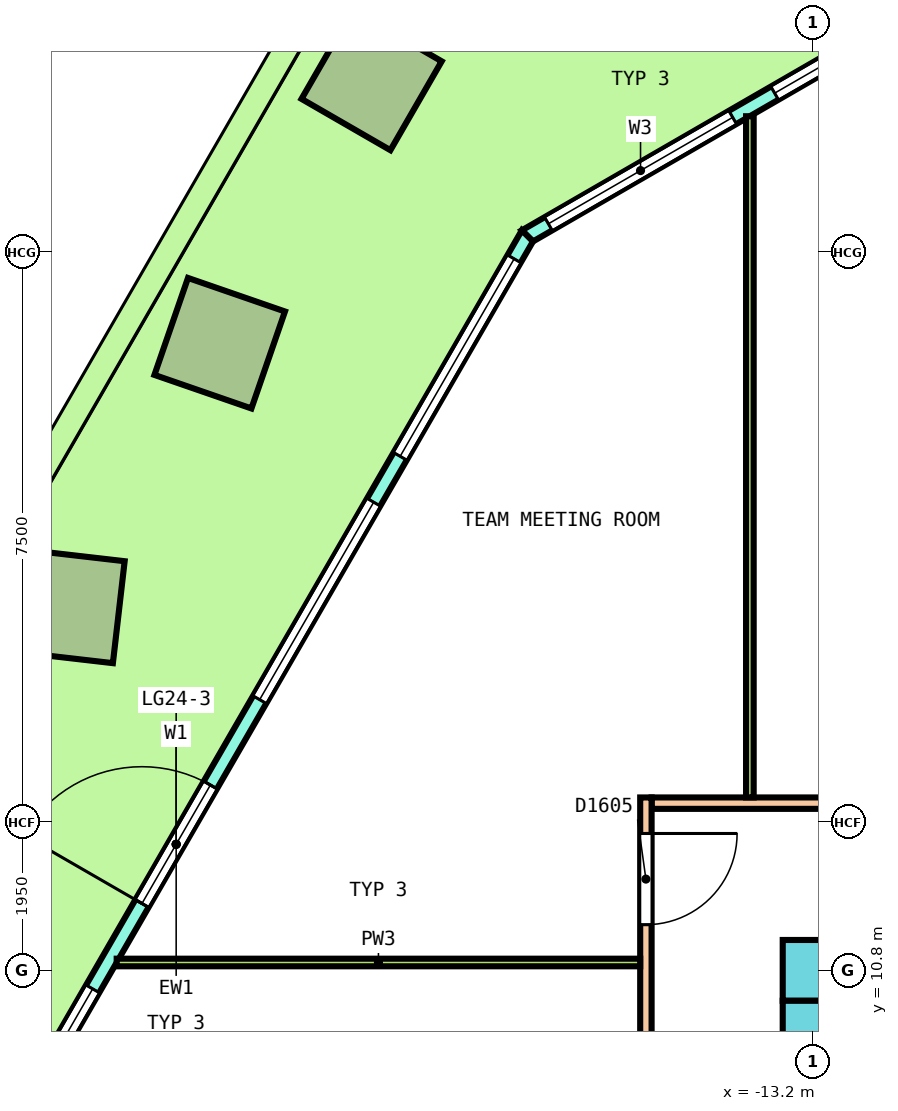
"""IFC4 building model, lengths in metres.
Left out: names, types, materials, properties, quantities, classifications, styles, units other than length and angle.
Written with IfcOpenShell. Run it as: python <this file> out.ifc"""

import sys

from ifc_helpers import new_model, si_unit, direction, frame, frame_2d, origin, origin_2d, place, context, subcontext, project, spatial, polyline, rectangle, outline, extrude, element, fill, save


model = new_model("IFC4")
c1 = context("Model", 3, precision=1e-05, world=origin(), true_north=direction((0.0, 1.0)))
c2 = subcontext(c1, "Body", "Model", "MODEL_VIEW")
j1 = project(units=[si_unit("LENGTHUNIT", "METRE"), si_unit("PLANEANGLEUNIT", "RADIAN")], contexts=[c1])
p1 = place(None, origin())
s1 = spatial("IfcSite", under=j1, at=p1, CompositionType="ELEMENT")
p2 = place(p1, origin())
s2 = spatial("IfcBuilding", under=s1, at=p2, CompositionType="ELEMENT")
p3 = place(p2, frame((0.0, 0.0, 113.2)))
s3 = spatial("IfcBuildingStorey", under=s2, at=p3, CompositionType="ELEMENT", Elevation=113.2)
p4 = place(p3, frame((-19.009, 22.512, 0.0), z_axis=(-0.036205074038, 0.0, 0.999344381389), x_axis=(-0.499425957592, -0.866167613071, -0.018093616283)))
e1 = element("IfcColumn", 1, at=p4, inside=s3, PredefinedType="COLUMN", context=c2, shape_type="SweptSolid", body=[
    extrude(rectangle(XDim=1.35, YDim=1.35, at=origin_2d()), origin(), (0.0, 0.0, 1.0), 4.053),
])
p5 = place(p3, frame((-21.007, 19.051, 0.0), z_axis=(-0.032654174822, 0.006325993277, 0.999446690262), x_axis=(-0.500478631698, -0.865680616164, -0.010872442804)))
e2 = element("IfcColumn", 2, at=p5, inside=s3, PredefinedType="COLUMN", context=c2, shape_type="SweptSolid", body=[
    extrude(rectangle(XDim=1.35, YDim=1.35, at=origin_2d()), origin(), (0.0, 0.0, 1.0), 4.052),
])
p6 = place(p3, frame((-23.006, 15.59, 0.0), z_axis=(-0.028980660531, 0.012532177527, 0.999501408624), x_axis=(-0.499450496938, -0.866334867635, -0.003619147421)))
e3 = element("IfcColumn", 3, at=p6, inside=s3, PredefinedType="COLUMN", context=c2, shape_type="SweptSolid", body=[
    extrude(rectangle(XDim=1.35, YDim=1.35, at=origin_2d()), origin(), (0.0, 0.0, 1.0), 4.052),
])
p7 = place(p3, frame((-11.005, 23.9, 0.0), z_axis=(0.0, 0.0, 1.0), x_axis=(-0.866029458321, -0.49999297727, 0.0)))
e4 = element("IfcWall", 4, at=p7, inside=s3, PredefinedType="SOLIDWALL", context=c2, shape_type="SweptSolid", body=[
    extrude(outline(polyline([(-0.027, -0.1), (1.128, -0.1), (2.282, -0.1), (3.437, -0.1), (4.592, -0.1), (5.747, -0.1), (6.901, -0.1), (6.848, 0.1), (5.711, 0.1), (4.574, 0.1), (3.437, 0.1), (2.301, 0.1), (1.164, 0.1), (0.027, 0.1), (-0.027, -0.1)])), origin(), (0.0, 0.0, 1.0), 4.1),
])
p8 = place(p7, frame((0.319, 0.0, 0.1)))
e5 = element("IfcOpeningElement", 5, at=p8, cuts=e4, PredefinedType="OPENING", context=c2, shape_type="SweptSolid", body=[
    extrude(rectangle(XDim=2.8, YDim=2.9, at=frame_2d((1.4, 1.45))), frame((0.0, 0.11, 0.0), z_axis=(0.0, -1.0, 0.0), x_axis=(1.0, 0.0, 0.0)), (0.0, 0.0, 1.0), 0.22),
])
p9 = place(p7, frame((3.756, 0.0, 0.1)))
e6 = element("IfcOpeningElement", 6, at=p9, cuts=e4, PredefinedType="OPENING", context=c2, shape_type="SweptSolid", body=[
    extrude(rectangle(XDim=2.8, YDim=2.9, at=frame_2d((1.4, 1.45))), frame((0.0, 0.11, 0.0), z_axis=(0.0, -1.0, 0.0), x_axis=(1.0, 0.0, 0.0)), (0.0, 0.0, 1.0), 0.22),
])
p10 = place(p3, frame((-16.959, 20.463, 0.0), z_axis=(0.0, 0.0, 1.0), x_axis=(-0.500000293238, -0.866025234483, 0.0)))
e7 = element("IfcWall", 7, at=p10, inside=s3, PredefinedType="SOLIDWALL", context=c2, shape_type="SweptSolid", body=[
    extrude(outline(polyline([(-0.027, -0.1), (1.003, -0.1), (2.033, -0.1), (3.063, -0.1), (4.093, -0.1), (5.122, -0.1), (6.152, -0.1), (7.182, -0.1), (8.212, -0.1), (9.242, -0.1), (10.271, -0.1), (11.301, -0.1), (12.331, -0.1), (13.361, -0.1), (14.391, -0.1), (15.421, -0.1), (16.451, -0.1), (17.48, -0.1), (18.51, -0.1), (18.457, 0.1), (17.433, 0.1), (16.409, 0.1), (15.385, 0.1), (14.361, 0.1), (13.337, 0.1), (12.313, 0.1), (11.29, 0.1), (10.266, 0.1), (9.242, 0.1), (8.218, 0.1), (7.194, 0.1), (6.17, 0.1), (5.146, 0.1), (4.122, 0.1), (3.098, 0.1), (2.075, 0.1), (1.051, 0.1), (0.027, 0.1), (-0.027, -0.1)])), origin(), (0.0, 0.0, 1.0), 4.1),
])
p11 = place(p10, frame((0.348, 0.0, 0.1)))
e8 = element("IfcOpeningElement", 8, at=p11, cuts=e7, PredefinedType="OPENING", context=c2, shape_type="SweptSolid", body=[
    extrude(rectangle(XDim=3.0, YDim=2.9, at=frame_2d((1.5, 1.45))), frame((0.0, 0.11, 0.0), z_axis=(0.0, -1.0, 0.0), x_axis=(1.0, 0.0, 0.0)), (0.0, 0.0, 1.0), 0.22),
])
p12 = place(p10, frame((4.045, 0.0, 0.1)))
e9 = element("IfcOpeningElement", 9, at=p12, cuts=e7, PredefinedType="OPENING", context=c2, shape_type="SweptSolid", body=[
    extrude(rectangle(XDim=3.0, YDim=2.9, at=frame_2d((1.5, 1.45))), frame((0.0, 0.11, 0.0), z_axis=(0.0, -1.0, 0.0), x_axis=(1.0, 0.0, 0.0)), (0.0, 0.0, 1.0), 0.22),
])
p13 = place(p10, frame((8.342, 0.0, 0.0)))
e10 = element("IfcOpeningElement", 10, at=p13, cuts=e7, PredefinedType="OPENING", context=c2, shape_type="SweptSolid", body=[
    extrude(rectangle(XDim=1.8, YDim=2.4, at=frame_2d((0.9, 1.2))), frame((0.0, 0.11, 0.0), z_axis=(0.0, -1.0, 0.0), x_axis=(1.0, 0.0, 0.0)), (0.0, 0.0, 1.0), 0.22),
])
p14 = place(p10, frame((8.342, 0.0, 2.55)))
e11 = element("IfcOpeningElement", 11, at=p14, cuts=e7, PredefinedType="OPENING", context=c2, shape_type="SweptSolid", body=[
    extrude(rectangle(XDim=1.8, YDim=0.45, at=frame_2d((0.9, 0.225))), frame((0.0, 0.11, 0.0), z_axis=(0.0, -1.0, 0.0), x_axis=(1.0, 0.0, 0.0)), (0.0, 0.0, 1.0), 0.22),
])
p15 = place(p10, frame((11.438, 0.0, 0.1)))
e12 = element("IfcOpeningElement", 12, at=p15, cuts=e7, PredefinedType="OPENING", context=c2, shape_type="SweptSolid", body=[
    extrude(rectangle(XDim=3.0, YDim=2.9, at=frame_2d((1.5, 1.45))), frame((0.0, 0.11, 0.0), z_axis=(0.0, -1.0, 0.0), x_axis=(1.0, 0.0, 0.0)), (0.0, 0.0, 1.0), 0.22),
])
p16 = place(p10, frame((15.135, 0.0, 0.1)))
e13 = element("IfcOpeningElement", 13, at=p16, cuts=e7, PredefinedType="OPENING", context=c2, shape_type="SweptSolid", body=[
    extrude(rectangle(XDim=3.0, YDim=2.9, at=frame_2d((1.5, 1.45))), frame((0.0, 0.11, 0.0), z_axis=(0.0, -1.0, 0.0), x_axis=(1.0, 0.0, 0.0)), (0.0, 0.0, 1.0), 0.22),
])
p17 = place(p3, frame((-13.6, 10.8, 0.0), z_axis=(0.0, 0.0, 1.0), x_axis=(1.0, 0.0, 0.0)))
e14 = element("IfcWall", 14, at=p17, inside=s3, PredefinedType="SHEAR", context=c2, shape_type="SweptSolid", body=[
    extrude(rectangle(XDim=27.2, YDim=0.8, at=frame_2d((13.6, 0.0))), origin(), (0.0, 0.0, 1.0), 4.1),
])
p18 = place(p17, frame((2.308, 0.0, 0.0)))
e15 = element("IfcOpeningElement", 15, at=p18, cuts=e14, PredefinedType="OPENING", context=c2, shape_type="SweptSolid", body=[
    extrude(rectangle(XDim=1.0, YDim=2.1, at=frame_2d((0.5, 1.05))), frame((0.0, 0.41, 0.0), z_axis=(0.0, -1.0, 0.0), x_axis=(1.0, 0.0, 0.0)), (0.0, 0.0, 1.0), 0.82),
])
p19 = place(p17, frame((6.419, 0.0, 0.0)))
e16 = element("IfcOpeningElement", 16, at=p19, cuts=e14, PredefinedType="OPENING", context=c2, shape_type="SweptSolid", body=[
    extrude(rectangle(XDim=1.0, YDim=2.1, at=frame_2d((0.5, 1.05))), frame((0.0, 0.41, 0.0), z_axis=(0.0, -1.0, 0.0), x_axis=(1.0, 0.0, 0.0)), (0.0, 0.0, 1.0), 0.82),
])
p20 = place(p17, frame((10.498, 0.0, 0.0)))
e17 = element("IfcOpeningElement", 17, at=p20, cuts=e14, PredefinedType="OPENING", context=c2, shape_type="SweptSolid", body=[
    extrude(rectangle(XDim=1.0, YDim=2.1, at=frame_2d((0.5, 1.05))), frame((0.0, 0.41, 0.0), z_axis=(0.0, -1.0, 0.0), x_axis=(1.0, 0.0, 0.0)), (0.0, 0.0, 1.0), 0.82),
])
p21 = place(p17, frame((18.035, 0.0, 0.0)))
e18 = element("IfcOpeningElement", 18, at=p21, cuts=e14, PredefinedType="OPENING", context=c2, shape_type="SweptSolid", body=[
    extrude(rectangle(XDim=1.0, YDim=2.1, at=frame_2d((0.5, 1.05))), frame((0.0, 0.41, 0.0), z_axis=(0.0, -1.0, 0.0), x_axis=(1.0, 0.0, 0.0)), (0.0, 0.0, 1.0), 0.82),
])
p22 = place(p17, frame((21.181, 0.0, 0.0)))
e19 = element("IfcOpeningElement", 19, at=p22, cuts=e14, PredefinedType="OPENING", context=c2, shape_type="SweptSolid", body=[
    extrude(rectangle(XDim=1.0, YDim=2.1, at=frame_2d((0.5, 1.05))), frame((0.0, 0.41, 0.0), z_axis=(0.0, -1.0, 0.0), x_axis=(1.0, 0.0, 0.0)), (0.0, 0.0, 1.0), 0.82),
])
p23 = place(p17, frame((24.358, 0.0, 0.0)))
e20 = element("IfcOpeningElement", 20, at=p23, cuts=e14, PredefinedType="OPENING", context=c2, shape_type="SweptSolid", body=[
    extrude(rectangle(XDim=1.0, YDim=2.1, at=frame_2d((0.5, 1.05))), frame((0.0, 0.41, 0.0), z_axis=(0.0, -1.0, 0.0), x_axis=(1.0, 0.0, 0.0)), (0.0, 0.0, 1.0), 0.82),
])
p24 = place(p17, frame((14.525, 0.0, 0.0)))
e21 = element("IfcOpeningElement", 21, at=p24, cuts=e14, PredefinedType="OPENING", context=c2, shape_type="SweptSolid", body=[
    extrude(rectangle(XDim=1.4, YDim=2.1, at=frame_2d((0.7, 1.05))), frame((0.0, 0.41, 0.0), z_axis=(0.0, -1.0, 0.0), x_axis=(1.0, 0.0, 0.0)), (0.0, 0.0, 1.0), 0.82),
])
p25 = place(p3, frame((-13.2, -10.4, 0.0), z_axis=(0.0, 0.0, 1.0), x_axis=(0.0, 1.0, 0.0)))
e22 = element("IfcWall", 22, at=p25, inside=s3, PredefinedType="SHEAR", context=c2, shape_type="SweptSolid", body=[
    extrude(rectangle(XDim=20.8, YDim=0.8, at=frame_2d((10.4, 0.0))), origin(), (0.0, 0.0, 1.0), 4.1),
])
p26 = place(p25, frame((9.2, 0.0, 0.0)))
e23 = element("IfcOpeningElement", 23, at=p26, cuts=e22, PredefinedType="OPENING", context=c2, shape_type="SweptSolid", body=[
    extrude(rectangle(XDim=2.4, YDim=2.1, at=frame_2d((1.2, 1.05))), frame((0.0, 0.41, 0.0), z_axis=(0.0, -1.0, 0.0), x_axis=(1.0, 0.0, 0.0)), (0.0, 0.0, 1.0), 0.82),
])
p27 = place(p25, frame((16.1, 0.0, 0.0)))
e24 = element("IfcOpeningElement", 24, at=p27, cuts=e22, PredefinedType="OPENING", context=c2, shape_type="SweptSolid", body=[
    extrude(rectangle(XDim=1.2, YDim=2.1, at=frame_2d((0.6, 1.05))), frame((0.0, 0.41, 0.0), z_axis=(0.0, -1.0, 0.0), x_axis=(1.0, 0.0, 0.0)), (0.0, 0.0, 1.0), 0.82),
])
p28 = place(p25, frame((3.5, 0.0, 0.0)))
e25 = element("IfcOpeningElement", 25, at=p28, cuts=e22, PredefinedType="OPENING", context=c2, shape_type="SweptSolid", body=[
    extrude(rectangle(XDim=1.2, YDim=2.1, at=frame_2d((0.6, 1.05))), frame((0.0, 0.41, 0.0), z_axis=(0.0, -1.0, 0.0), x_axis=(1.0, 0.0, 0.0)), (0.0, 0.0, 1.0), 0.82),
])
p29 = place(p3, frame((-15.325, 13.0, 0.0), z_axis=(0.0, 0.0, 1.0), x_axis=(1.0, 0.0, 0.0)))
e26 = element("IfcWall", 26, at=p29, inside=s3, PredefinedType="PARTITIONING", context=c2, shape_type="SweptSolid", body=[
    extrude(rectangle(XDim=30.65, YDim=0.15, at=frame_2d((15.325, 0.0))), origin(), (0.0, 0.0, 1.0), 3.05),
])
p30 = place(p29, frame((24.294, 0.0, 0.0)))
e27 = element("IfcOpeningElement", 27, at=p30, cuts=e26, PredefinedType="OPENING", context=c2, shape_type="SweptSolid", body=[
    extrude(rectangle(XDim=1.0, YDim=2.1, at=frame_2d((0.5, 1.05))), frame((0.0, 0.085, 0.0), z_axis=(0.0, -1.0, 0.0), x_axis=(1.0, 0.0, 0.0)), (0.0, 0.0, 1.0), 0.17),
])
p31 = place(p29, frame((13.024, 0.0, 0.0)))
e28 = element("IfcOpeningElement", 28, at=p31, cuts=e26, PredefinedType="OPENING", context=c2, shape_type="SweptSolid", body=[
    extrude(rectangle(XDim=1.2, YDim=2.1, at=frame_2d((0.6, 1.05))), frame((0.0, 0.085, 0.0), z_axis=(0.0, -1.0, 0.0), x_axis=(1.0, 0.0, 0.0)), (0.0, 0.0, 1.0), 0.17),
])
p32 = place(p29, frame((3.573, 0.0, 0.0)))
e29 = element("IfcOpeningElement", 29, at=p32, cuts=e26, PredefinedType="OPENING", context=c2, shape_type="SweptSolid", body=[
    extrude(rectangle(XDim=1.2, YDim=2.1, at=frame_2d((0.6, 1.05))), frame((0.0, 0.085, 0.0), z_axis=(0.0, -1.0, 0.0), x_axis=(1.0, 0.0, 0.0)), (0.0, 0.0, 1.0), 0.17),
])
p33 = place(p3, frame((-15.4, 0.211, 0.0), z_axis=(0.0, 0.0, 1.0), x_axis=(0.0, 1.0, 0.0)))
e30 = element("IfcWall", 30, at=p33, inside=s3, PredefinedType="PARTITIONING", context=c2, shape_type="SweptSolid", body=[
    extrude(rectangle(XDim=12.864, YDim=0.15, at=frame_2d((6.432, 0.0))), origin(), (0.0, 0.0, 1.0), 3.05),
])
p34 = place(p33, frame((11.19, 0.0, 0.0)))
e31 = element("IfcOpeningElement", 31, at=p34, cuts=e30, PredefinedType="OPENING", context=c2, shape_type="SweptSolid", body=[
    extrude(rectangle(XDim=1.2, YDim=2.1, at=frame_2d((0.6, 1.05))), frame((0.0, 0.085, 0.0), z_axis=(0.0, -1.0, 0.0), x_axis=(1.0, 0.0, 0.0)), (0.0, 0.0, 1.0), 0.17),
])
p35 = place(p33, frame((6.274, 0.0, 0.0)))
e32 = element("IfcOpeningElement", 32, at=p35, cuts=e30, PredefinedType="OPENING", context=c2, shape_type="SweptSolid", body=[
    extrude(rectangle(XDim=1.0, YDim=2.1, at=frame_2d((0.5, 1.05))), frame((0.0, 0.085, 0.0), z_axis=(0.0, -1.0, 0.0), x_axis=(1.0, 0.0, 0.0)), (0.0, 0.0, 1.0), 0.17),
])
p36 = place(p3, frame((-14.032, 13.075, 0.0), z_axis=(0.0, 0.0, 1.0), x_axis=(0.0, 1.0, 0.0)))
e33 = element("IfcWall", 33, at=p36, inside=s3, PredefinedType="PARTITIONING", context=c2, shape_type="SweptSolid", body=[
    extrude(rectangle(XDim=8.962, YDim=0.1, at=frame_2d((4.481, 0.0))), origin(), (0.0, 0.0, 1.0), 3.05),
])
p37 = place(p3, frame((-22.362, 10.904, 0.0), z_axis=(0.0, 0.0, 1.0), x_axis=(1.0, 0.0, 0.0)))
e34 = element("IfcWall", 34, at=p37, inside=s3, PredefinedType="PARTITIONING", context=c2, shape_type="SweptSolid", body=[
    extrude(rectangle(XDim=6.887, YDim=0.1, at=frame_2d((3.444, 0.0))), origin(), (0.0, 0.0, 1.0), 3.05),
])
p38 = place(p8, origin())
e35 = element("IfcWindow", 35, at=p38, inside=s3, PartitioningType="SINGLE_PANEL", PredefinedType="WINDOW", context=c2, shape_type="SweptSolid", body=[
    extrude(rectangle(XDim=2.8, YDim=2.9, at=frame_2d((1.4, 1.45))), frame((0.0, 0.03, 0.0), z_axis=(0.0, -1.0, 0.0), x_axis=(1.0, 0.0, 0.0)), (0.0, 0.0, 1.0), 0.06),
])
fill(e5, e35)
p39 = place(p9, origin())
e36 = element("IfcWindow", 36, at=p39, inside=s3, PartitioningType="SINGLE_PANEL", PredefinedType="WINDOW", context=c2, shape_type="SweptSolid", body=[
    extrude(rectangle(XDim=2.8, YDim=2.9, at=frame_2d((1.4, 1.45))), frame((0.0, 0.03, 0.0), z_axis=(0.0, -1.0, 0.0), x_axis=(1.0, 0.0, 0.0)), (0.0, 0.0, 1.0), 0.06),
])
fill(e6, e36)
p40 = place(p11, origin())
e37 = element("IfcWindow", 37, at=p40, inside=s3, PartitioningType="SINGLE_PANEL", PredefinedType="WINDOW", context=c2, shape_type="SweptSolid", body=[
    extrude(rectangle(XDim=3.0, YDim=2.9, at=frame_2d((1.5, 1.45))), frame((0.0, 0.03, 0.0), z_axis=(0.0, -1.0, 0.0), x_axis=(1.0, 0.0, 0.0)), (0.0, 0.0, 1.0), 0.06),
])
fill(e8, e37)
p41 = place(p12, origin())
e38 = element("IfcWindow", 38, at=p41, inside=s3, PartitioningType="SINGLE_PANEL", PredefinedType="WINDOW", context=c2, shape_type="SweptSolid", body=[
    extrude(rectangle(XDim=3.0, YDim=2.9, at=frame_2d((1.5, 1.45))), frame((0.0, 0.03, 0.0), z_axis=(0.0, -1.0, 0.0), x_axis=(1.0, 0.0, 0.0)), (0.0, 0.0, 1.0), 0.06),
])
fill(e9, e38)
p42 = place(p13, origin())
e39 = element("IfcDoor", 39, at=p42, inside=s3, OperationType="DOUBLE_DOOR_SINGLE_SWING", PredefinedType="DOOR", context=c2, shape_type="SweptSolid", body=[
    extrude(rectangle(XDim=1.8, YDim=2.4, at=frame_2d((0.9, 1.2))), frame((0.0, 0.025, 0.0), z_axis=(0.0, -1.0, 0.0), x_axis=(1.0, 0.0, 0.0)), (0.0, 0.0, 1.0), 0.05),
])
fill(e10, e39)
p43 = place(p14, origin())
e40 = element("IfcWindow", 40, at=p43, inside=s3, PartitioningType="SINGLE_PANEL", PredefinedType="WINDOW", context=c2, shape_type="SweptSolid", body=[
    extrude(rectangle(XDim=1.8, YDim=0.45, at=frame_2d((0.9, 0.225))), frame((0.0, 0.03, 0.0), z_axis=(0.0, -1.0, 0.0), x_axis=(1.0, 0.0, 0.0)), (0.0, 0.0, 1.0), 0.06),
])
fill(e11, e40)
p44 = place(p15, origin())
e41 = element("IfcWindow", 41, at=p44, inside=s3, PartitioningType="SINGLE_PANEL", PredefinedType="WINDOW", context=c2, shape_type="SweptSolid", body=[
    extrude(rectangle(XDim=3.0, YDim=2.9, at=frame_2d((1.5, 1.45))), frame((0.0, 0.03, 0.0), z_axis=(0.0, -1.0, 0.0), x_axis=(1.0, 0.0, 0.0)), (0.0, 0.0, 1.0), 0.06),
])
fill(e12, e41)
p45 = place(p34, origin())
e42 = element("IfcDoor", 42, at=p45, inside=s3, OperationType="DOUBLE_DOOR_SINGLE_SWING", PredefinedType="DOOR", context=c2, shape_type="SweptSolid", body=[
    extrude(rectangle(XDim=1.2, YDim=2.1, at=frame_2d((0.6, 1.05))), frame((0.0, 0.025, 0.0), z_axis=(0.0, -1.0, 0.0), x_axis=(1.0, 0.0, 0.0)), (0.0, 0.0, 1.0), 0.05),
])
fill(e31, e42)
save(model, sys.argv[1])
